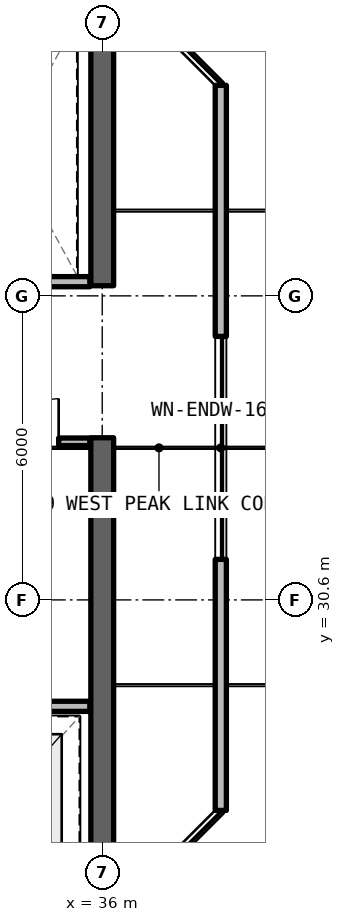
"""IFC4 building model, lengths in metres.
Left out: names, types, materials, properties, quantities, classifications, styles, units other than length and angle.
Written with IfcOpenShell. Run it as: python <this file> out.ifc"""

import sys

from ifc_helpers import new_model, si_unit, direction, frame, frame_2d, origin, place, context, subcontext, project, spatial, rectangle, extrude, element, fill, save


model = new_model("IFC4")
c1 = context("Model", 3, precision=1e-05, world=origin(), true_north=direction((0.0, 1.0)))
c2 = subcontext(c1, "Body", "Model", "MODEL_VIEW")
j1 = project(units=[si_unit("LENGTHUNIT", "METRE"), si_unit("PLANEANGLEUNIT", "RADIAN")], contexts=[c1])
p1 = place(None, origin())
s1 = spatial("IfcSite", under=j1, at=p1, CompositionType="ELEMENT")
p2 = place(p1, origin())
s2 = spatial("IfcBuilding", under=s1, at=p2, CompositionType="ELEMENT")
p3 = place(p2, frame((0.0, 0.0, 235.95)))
s3 = spatial("IfcBuildingStorey", under=s2, at=p3, CompositionType="ELEMENT", Elevation=235.95)
p4 = place(p3, frame((36.0, 24.825, 0.0), z_axis=(0.0, 0.0, 1.0), x_axis=(0.0, 1.0, 0.0)))
e1 = element("IfcWall", 1, at=p4, inside=s3, PredefinedType="SHEAR", context=c2, shape_type="SweptSolid", body=[
    extrude(rectangle(XDim=8.975, YDim=0.45, at=frame_2d((4.488, 0.0))), origin(), (0.0, 0.0, 1.0), 3.3),
])
p5 = place(p3, frame((36.0, 36.8, 0.0), z_axis=(0.0, 0.0, 1.0), x_axis=(0.0, 1.0, 0.0)))
e2 = element("IfcWall", 2, at=p5, inside=s3, PredefinedType="SHEAR", context=c2, shape_type="SweptSolid", body=[
    extrude(rectangle(XDim=5.575, YDim=0.45, at=frame_2d((2.788, 0.0))), origin(), (0.0, 0.0, 1.0), 3.3),
])
p6 = place(p3, frame((38.34, 26.446, 0.0), z_axis=(0.0, 0.0, 1.0), x_axis=(0.0, 1.0, 0.0)))
e3 = element("IfcWall", 3, at=p6, inside=s3, PredefinedType="SOLIDWALL", context=c2, shape_type="SweptSolid", body=[
    extrude(rectangle(XDim=14.309, YDim=0.22, at=frame_2d((7.154, 0.0))), origin(), (0.0, 0.0, 1.0), 3.08),
])
p7 = place(p6, frame((4.954, 0.0, 0.78)))
e4 = element("IfcOpeningElement", 4, at=p7, cuts=e3, PredefinedType="OPENING", context=c2, shape_type="SweptSolid", body=[
    extrude(rectangle(XDim=4.4, YDim=1.66, at=frame_2d((2.2, 0.83))), frame((0.0, 0.12, 0.0), z_axis=(0.0, -1.0, 0.0), x_axis=(1.0, 0.0, 0.0)), (0.0, 0.0, 1.0), 0.24),
])
p8 = place(p3, frame((28.17, 28.5, 0.0), z_axis=(0.0, 0.0, 1.0), x_axis=(1.0, 0.0, 0.0)))
e5 = element("IfcWall", 5, at=p8, inside=s3, PredefinedType="SOLIDWALL", context=c2, shape_type="SweptSolid", body=[
    extrude(rectangle(XDim=7.585, YDim=0.2, at=frame_2d((3.792, 0.0))), origin(), (0.0, 0.0, 1.0), 2.35),
])
p9 = place(p8, frame((3.03, 0.0, 0.0)))
e6 = element("IfcOpeningElement", 6, at=p9, cuts=e5, PredefinedType="OPENING", context=c2, shape_type="SweptSolid", body=[
    extrude(rectangle(XDim=1.0, YDim=2.15, at=frame_2d((0.5, 1.075))), frame((0.0, 0.11, 0.0), z_axis=(0.0, -1.0, 0.0), x_axis=(1.0, 0.0, 0.0)), (0.0, 0.0, 1.0), 0.22),
])
p10 = place(p3, frame((34.01, 33.72, 0.0), z_axis=(0.0, 0.0, 1.0), x_axis=(1.0, 0.0, 0.0)))
e7 = element("IfcWall", 7, at=p10, inside=s3, PredefinedType="SOLIDWALL", context=c2, shape_type="SweptSolid", body=[
    extrude(rectangle(XDim=1.745, YDim=0.15, at=frame_2d((0.873, 0.0))), origin(), (0.0, 0.0, 1.0), 2.35),
])
p11 = place(p10, frame((0.28, 0.0, 0.0)))
e8 = element("IfcOpeningElement", 8, at=p11, cuts=e7, PredefinedType="OPENING", context=c2, shape_type="SweptSolid", body=[
    extrude(rectangle(XDim=0.85, YDim=2.1, at=frame_2d((0.425, 1.05))), frame((0.0, 0.085, 0.0), z_axis=(0.0, -1.0, 0.0), x_axis=(1.0, 0.0, 0.0)), (0.0, 0.0, 1.0), 0.17),
])
p12 = place(p3, frame((32.68, 36.88, 0.0), z_axis=(0.0, 0.0, 1.0), x_axis=(1.0, 0.0, 0.0)))
e9 = element("IfcWall", 9, at=p12, inside=s3, PredefinedType="SOLIDWALL", context=c2, shape_type="SweptSolid", body=[
    extrude(rectangle(XDim=3.075, YDim=0.2, at=frame_2d((1.538, 0.0))), origin(), (0.0, 0.0, 1.0), 2.35),
])
p13 = place(p7, origin())
e10 = element("IfcWindow", 10, at=p13, inside=s3, PartitioningType="SINGLE_PANEL", PredefinedType="WINDOW", context=c2, shape_type="SweptSolid", body=[
    extrude(rectangle(XDim=4.4, YDim=1.66, at=frame_2d((2.2, 0.83))), frame((0.0, 0.03, 0.0), z_axis=(0.0, -1.0, 0.0), x_axis=(1.0, 0.0, 0.0)), (0.0, 0.0, 1.0), 0.06),
])
fill(e4, e10)
p14 = place(p11, origin())
e11 = element("IfcDoor", 11, at=p14, inside=s3, OperationType="SINGLE_SWING_RIGHT", PredefinedType="DOOR", context=c2, shape_type="SweptSolid", body=[
    extrude(rectangle(XDim=0.85, YDim=2.1, at=frame_2d((0.425, 1.05))), frame((0.0, 0.025, 0.0), z_axis=(0.0, -1.0, 0.0), x_axis=(1.0, 0.0, 0.0)), (0.0, 0.0, 1.0), 0.05),
])
fill(e8, e11)
save(model, sys.argv[1])
